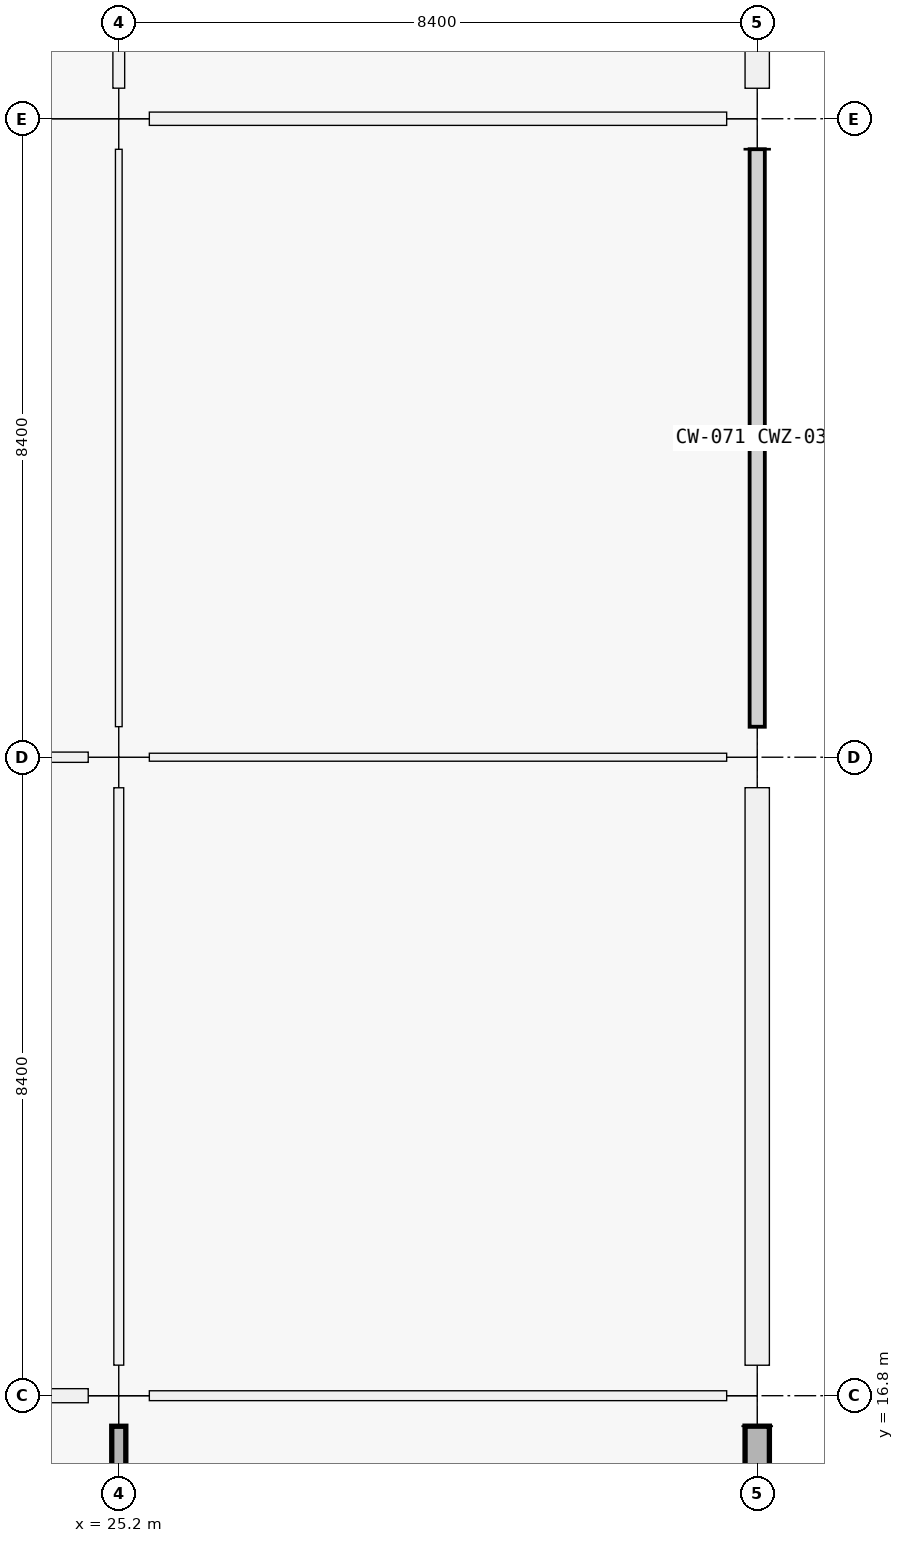
"""IFC4 building model, lengths in metres.
Left out: names, types, materials, properties, quantities, classifications, styles, units other than length and angle.
Written with IfcOpenShell. Run it as: python <this file> out.ifc"""

import sys

from ifc_helpers import new_model, si_unit, direction, frame, frame_2d, origin, origin_2d, place, context, subcontext, project, spatial, rectangle, extrude, element, fill, save


model = new_model("IFC4")
c1 = context("Model", 3, precision=1e-05, world=origin(), true_north=direction((0.0, 1.0)))
c2 = subcontext(c1, "Body", "Model", "MODEL_VIEW")
j1 = project(units=[si_unit("LENGTHUNIT", "METRE"), si_unit("PLANEANGLEUNIT", "RADIAN")], contexts=[c1])
p1 = place(None, origin())
s1 = spatial("IfcSite", under=j1, at=p1, CompositionType="ELEMENT")
p2 = place(p1, origin())
s2 = spatial("IfcBuilding", under=s1, at=p2, CompositionType="ELEMENT")
p3 = place(p2, frame((0.0, 0.0, 5.76)))
s3 = spatial("IfcBuildingStorey", under=s2, at=p3, CompositionType="ELEMENT", Elevation=5.76)
for number, where, z_axis, x_axis in (
    (1, (25.2, 16.8, 0.0), (0.0, 0.0, 1.0), (1.0, 0.0, 0.0)),
    (2, (25.2, 25.2, 0.0), (0.0, 0.0, 1.0), (1.0, 0.0, 0.0)),
    (3, (25.2, 33.6, 0.0), (0.0, 0.0, 1.0), (1.0, 0.0, 0.0)),
    (4, (33.6, 16.8, 0.0), (0.0, 0.0, 1.0), (1.0, 0.0, 0.0)),
    (5, (33.6, 25.2, 0.0), (0.0, 0.0, 1.0), (1.0, 0.0, 0.0)),
    (6, (33.6, 33.6, 0.0), (0.0, 0.0, 1.0), (1.0, 0.0, 0.0)),
):
    element("IfcColumn", number, at=place(p3, frame(where, z_axis=z_axis, x_axis=x_axis)), inside=s3, PredefinedType="COLUMN", context=c2, shape_type="SweptSolid", body=[
        extrude(rectangle(XDim=0.8, YDim=0.8, at=origin_2d()), origin(), (0.0, 0.0, 1.0), 4.5),
    ])
p4 = place(p3, frame((33.6, 16.399, 0.0), z_axis=(0.0, 0.0, 1.0), x_axis=(0.0, -1.0, 0.0)))
e7 = element("IfcWall", 7, at=p4, inside=s3, PredefinedType="SOLIDWALL", context=c2, shape_type="SweptSolid", body=[
    extrude(rectangle(XDim=7.698, YDim=0.32, at=frame_2d((3.849, 0.0))), origin(), (0.0, 0.0, 1.0), 3.4),
])
p5 = place(p4, frame((2.699, 0.0, 0.9)))
e8 = element("IfcOpeningElement", 8, at=p5, cuts=e7, PredefinedType="OPENING", context=c2, shape_type="SweptSolid", body=[
    extrude(rectangle(XDim=2.3, YDim=1.85, at=frame_2d((1.15, 0.925))), frame((0.0, 0.16, 0.0), z_axis=(0.0, -1.0, 0.0), x_axis=(1.0, 0.0, 0.0)), (0.0, 0.0, 1.0), 0.32),
])
p6 = place(p3, frame((33.6, 24.799, 0.0), z_axis=(0.0, 0.0, 1.0), x_axis=(0.0, -1.0, 0.0)))
e9 = element("IfcWall", 9, at=p6, inside=s3, PredefinedType="SOLIDWALL", context=c2, shape_type="SweptSolid", body=[
    extrude(rectangle(XDim=7.598, YDim=0.32, at=frame_2d((3.799, 0.0))), origin(), (0.0, 0.0, 1.0), 3.4),
])
p7 = place(p6, frame((2.349, 0.0, 0.9)))
e10 = element("IfcOpeningElement", 10, at=p7, cuts=e9, PredefinedType="OPENING", context=c2, shape_type="SweptSolid", body=[
    extrude(rectangle(XDim=2.9, YDim=1.85, at=frame_2d((1.45, 0.925))), frame((0.0, 0.16, 0.0), z_axis=(0.0, -1.0, 0.0), x_axis=(1.0, 0.0, 0.0)), (0.0, 0.0, 1.0), 0.32),
])
p8 = place(p3, frame((33.6, 41.599, 0.0), z_axis=(0.0, 0.0, 1.0), x_axis=(0.0, -1.0, 0.0)))
e11 = element("IfcWall", 11, at=p8, inside=s3, PredefinedType="SOLIDWALL", context=c2, shape_type="SweptSolid", body=[
    extrude(rectangle(XDim=7.598, YDim=0.32, at=frame_2d((3.799, 0.0))), origin(), (0.0, 0.0, 1.0), 3.4),
])
p9 = place(p8, frame((3.074, 0.0, 0.9)))
e12 = element("IfcOpeningElement", 12, at=p9, cuts=e11, PredefinedType="OPENING", context=c2, shape_type="SweptSolid", body=[
    extrude(rectangle(XDim=1.45, YDim=1.85, at=frame_2d((0.725, 0.925))), frame((0.0, 0.16, 0.0), z_axis=(0.0, -1.0, 0.0), x_axis=(1.0, 0.0, 0.0)), (0.0, 0.0, 1.0), 0.32),
])
p10 = place(p3, frame((17.202, 16.8, 0.0), z_axis=(0.0, 0.0, 1.0), x_axis=(1.0, 0.0, 0.0)))
e13 = element("IfcWall", 13, at=p10, inside=s3, PredefinedType="PARTITIONING", context=c2, shape_type="SweptSolid", body=[
    extrude(rectangle(XDim=7.596, YDim=0.185, at=frame_2d((3.798, 0.0))), origin(), (0.0, 0.0, 1.0), 2.4),
])
p11 = place(p10, frame((3.268, 0.0, 0.0)))
e14 = element("IfcOpeningElement", 14, at=p11, cuts=e13, PredefinedType="OPENING", context=c2, shape_type="SweptSolid", body=[
    extrude(rectangle(XDim=1.06, YDim=2.22, at=frame_2d((0.53, 1.11))), frame((0.0, 0.093, 0.0), z_axis=(0.0, -1.0, 0.0), x_axis=(1.0, 0.0, 0.0)), (0.0, 0.0, 1.0), 0.185),
])
p12 = place(p3, frame((17.202, 25.2, 0.0), z_axis=(0.0, 0.0, 1.0), x_axis=(1.0, 0.0, 0.0)))
e15 = element("IfcWall", 15, at=p12, inside=s3, PredefinedType="PARTITIONING", context=c2, shape_type="SweptSolid", body=[
    extrude(rectangle(XDim=7.596, YDim=0.135, at=frame_2d((3.798, 0.0))), origin(), (0.0, 0.0, 1.0), 2.4),
])
p13 = place(p12, frame((3.338, 0.0, 0.0)))
e16 = element("IfcOpeningElement", 16, at=p13, cuts=e15, PredefinedType="OPENING", context=c2, shape_type="SweptSolid", body=[
    extrude(rectangle(XDim=0.92, YDim=2.15, at=frame_2d((0.46, 1.075))), frame((0.0, 0.067, 0.0), z_axis=(0.0, -1.0, 0.0), x_axis=(1.0, 0.0, 0.0)), (0.0, 0.0, 1.0), 0.135),
])
p14 = place(p3, frame((25.602, 16.8, 0.0), z_axis=(0.0, 0.0, 1.0), x_axis=(1.0, 0.0, 0.0)))
e17 = element("IfcWall", 17, at=p14, inside=s3, PredefinedType="MOVABLE", context=c2, shape_type="SweptSolid", body=[
    extrude(rectangle(XDim=7.596, YDim=0.13, at=frame_2d((3.798, 0.0))), origin(), (0.0, 0.0, 1.0), 2.4),
])
p15 = place(p14, frame((3.313, 0.0, 0.0)))
e18 = element("IfcOpeningElement", 18, at=p15, cuts=e17, PredefinedType="OPENING", context=c2, shape_type="SweptSolid", body=[
    extrude(rectangle(XDim=0.97, YDim=2.12, at=frame_2d((0.485, 1.06))), frame((0.0, 0.065, 0.0), z_axis=(0.0, -1.0, 0.0), x_axis=(1.0, 0.0, 0.0)), (0.0, 0.0, 1.0), 0.13),
])
p16 = place(p3, frame((25.602, 25.2, 0.0), z_axis=(0.0, 0.0, 1.0), x_axis=(1.0, 0.0, 0.0)))
e19 = element("IfcWall", 19, at=p16, inside=s3, PredefinedType="PARTITIONING", context=c2, shape_type="SweptSolid", body=[
    extrude(rectangle(XDim=7.596, YDim=0.105, at=frame_2d((3.798, 0.0))), origin(), (0.0, 0.0, 1.0), 2.4),
])
p17 = place(p16, frame((3.278, 0.0, 0.0)))
e20 = element("IfcOpeningElement", 20, at=p17, cuts=e19, PredefinedType="OPENING", context=c2, shape_type="SweptSolid", body=[
    extrude(rectangle(XDim=1.04, YDim=2.2, at=frame_2d((0.52, 1.1))), frame((0.0, 0.052, 0.0), z_axis=(0.0, -1.0, 0.0), x_axis=(1.0, 0.0, 0.0)), (0.0, 0.0, 1.0), 0.105),
])
p18 = place(p3, frame((25.602, 33.6, 0.0), z_axis=(0.0, 0.0, 1.0), x_axis=(1.0, 0.0, 0.0)))
e21 = element("IfcWall", 21, at=p18, inside=s3, PredefinedType="PARTITIONING", context=c2, shape_type="SweptSolid", body=[
    extrude(rectangle(XDim=7.596, YDim=0.175, at=frame_2d((3.798, 0.0))), origin(), (0.0, 0.0, 1.0), 2.4),
])
p19 = place(p18, frame((3.333, 0.0, 0.0)))
e22 = element("IfcOpeningElement", 22, at=p19, cuts=e21, PredefinedType="OPENING", context=c2, shape_type="SweptSolid", body=[
    extrude(rectangle(XDim=0.93, YDim=2.12, at=frame_2d((0.465, 1.06))), frame((0.0, 0.087, 0.0), z_axis=(0.0, -1.0, 0.0), x_axis=(1.0, 0.0, 0.0)), (0.0, 0.0, 1.0), 0.175),
])
p20 = place(p3, frame((25.2, 8.727, 0.0), z_axis=(0.0, 0.0, 1.0), x_axis=(0.0, 1.0, 0.0)))
e23 = element("IfcWall", 23, at=p20, inside=s3, PredefinedType="PARTITIONING", context=c2, shape_type="SweptSolid", body=[
    extrude(rectangle(XDim=7.671, YDim=0.185, at=frame_2d((3.835, 0.0))), origin(), (0.0, 0.0, 1.0), 2.4),
])
p21 = place(p20, frame((3.306, 0.0, 0.0)))
e24 = element("IfcOpeningElement", 24, at=p21, cuts=e23, PredefinedType="OPENING", context=c2, shape_type="SweptSolid", body=[
    extrude(rectangle(XDim=1.06, YDim=2.22, at=frame_2d((0.53, 1.11))), frame((0.0, 0.093, 0.0), z_axis=(0.0, -1.0, 0.0), x_axis=(1.0, 0.0, 0.0)), (0.0, 0.0, 1.0), 0.185),
])
p22 = place(p3, frame((25.2, 17.202, 0.0), z_axis=(0.0, 0.0, 1.0), x_axis=(0.0, 1.0, 0.0)))
e25 = element("IfcWall", 25, at=p22, inside=s3, PredefinedType="MOVABLE", context=c2, shape_type="SweptSolid", body=[
    extrude(rectangle(XDim=7.596, YDim=0.13, at=frame_2d((3.798, 0.0))), origin(), (0.0, 0.0, 1.0), 2.4),
])
p23 = place(p22, frame((3.278, 0.0, 0.0)))
e26 = element("IfcOpeningElement", 26, at=p23, cuts=e25, PredefinedType="OPENING", context=c2, shape_type="SweptSolid", body=[
    extrude(rectangle(XDim=1.04, YDim=2.2, at=frame_2d((0.52, 1.1))), frame((0.0, 0.065, 0.0), z_axis=(0.0, -1.0, 0.0), x_axis=(1.0, 0.0, 0.0)), (0.0, 0.0, 1.0), 0.13),
])
p24 = place(p3, frame((25.2, 25.602, 0.0), z_axis=(0.0, 0.0, 1.0), x_axis=(0.0, 1.0, 0.0)))
e27 = element("IfcWall", 27, at=p24, inside=s3, PredefinedType="PARTITIONING", context=c2, shape_type="SweptSolid", body=[
    extrude(rectangle(XDim=7.596, YDim=0.088, at=frame_2d((3.798, 0.0))), origin(), (0.0, 0.0, 1.0), 2.4),
])
p25 = place(p24, frame((3.268, 0.0, 0.0)))
e28 = element("IfcOpeningElement", 28, at=p25, cuts=e27, PredefinedType="OPENING", context=c2, shape_type="SweptSolid", body=[
    extrude(rectangle(XDim=1.06, YDim=2.22, at=frame_2d((0.53, 1.11))), frame((0.0, 0.044, 0.0), z_axis=(0.0, -1.0, 0.0), x_axis=(1.0, 0.0, 0.0)), (0.0, 0.0, 1.0), 0.088),
])
p26 = place(p3, frame((25.2, 34.002, 0.0), z_axis=(0.0, 0.0, 1.0), x_axis=(0.0, 1.0, 0.0)))
e29 = element("IfcWall", 29, at=p26, inside=s3, PredefinedType="PARTITIONING", context=c2, shape_type="SweptSolid", body=[
    extrude(rectangle(XDim=7.596, YDim=0.155, at=frame_2d((3.798, 0.0))), origin(), (0.0, 0.0, 1.0), 2.4),
])
p27 = place(p26, frame((3.278, 0.0, 0.0)))
e30 = element("IfcOpeningElement", 30, at=p27, cuts=e29, PredefinedType="OPENING", context=c2, shape_type="SweptSolid", body=[
    extrude(rectangle(XDim=1.04, YDim=2.2, at=frame_2d((0.52, 1.1))), frame((0.0, 0.078, 0.0), z_axis=(0.0, -1.0, 0.0), x_axis=(1.0, 0.0, 0.0)), (0.0, 0.0, 1.0), 0.155),
])
p28 = place(p7, origin())
e31 = element("IfcWindow", 31, at=p28, inside=s3, PartitioningType="SINGLE_PANEL", PredefinedType="WINDOW", context=c2, shape_type="SweptSolid", body=[
    extrude(rectangle(XDim=2.9, YDim=1.85, at=frame_2d((1.45, 0.925))), frame((0.0, 0.03, 0.0), z_axis=(0.0, -1.0, 0.0), x_axis=(1.0, 0.0, 0.0)), (0.0, 0.0, 1.0), 0.06),
])
fill(e10, e31)
p29 = place(p25, origin())
e32 = element("IfcDoor", 32, at=p29, inside=s3, OperationType="SINGLE_SWING_LEFT", PredefinedType="DOOR", context=c2, shape_type="SweptSolid", body=[
    extrude(rectangle(XDim=1.06, YDim=2.22, at=frame_2d((0.53, 1.11))), frame((0.0, 0.025, 0.0), z_axis=(0.0, -1.0, 0.0), x_axis=(1.0, 0.0, 0.0)), (0.0, 0.0, 1.0), 0.05),
])
fill(e28, e32)
p30 = place(p15, origin())
e33 = element("IfcDoor", 33, at=p30, inside=s3, OperationType="SINGLE_SWING_RIGHT", PredefinedType="DOOR", context=c2, shape_type="SweptSolid", body=[
    extrude(rectangle(XDim=0.97, YDim=2.12, at=frame_2d((0.485, 1.06))), frame((0.0, 0.025, 0.0), z_axis=(0.0, -1.0, 0.0), x_axis=(1.0, 0.0, 0.0)), (0.0, 0.0, 1.0), 0.05),
])
fill(e18, e33)
p31 = place(p17, origin())
e34 = element("IfcDoor", 34, at=p31, inside=s3, OperationType="SINGLE_SWING_RIGHT", PredefinedType="DOOR", context=c2, shape_type="SweptSolid", body=[
    extrude(rectangle(XDim=1.04, YDim=2.2, at=frame_2d((0.52, 1.1))), frame((0.0, 0.025, 0.0), z_axis=(0.0, -1.0, 0.0), x_axis=(1.0, 0.0, 0.0)), (0.0, 0.0, 1.0), 0.05),
])
fill(e20, e34)
p32 = place(p19, origin())
e35 = element("IfcDoor", 35, at=p32, inside=s3, OperationType="SINGLE_SWING_RIGHT", PredefinedType="DOOR", context=c2, shape_type="SweptSolid", body=[
    extrude(rectangle(XDim=0.93, YDim=2.12, at=frame_2d((0.465, 1.06))), frame((0.0, 0.025, 0.0), z_axis=(0.0, -1.0, 0.0), x_axis=(1.0, 0.0, 0.0)), (0.0, 0.0, 1.0), 0.05),
])
fill(e22, e35)
p33 = place(p23, origin())
e36 = element("IfcDoor", 36, at=p33, inside=s3, OperationType="SINGLE_SWING_RIGHT", PredefinedType="DOOR", context=c2, shape_type="SweptSolid", body=[
    extrude(rectangle(XDim=1.04, YDim=2.2, at=frame_2d((0.52, 1.1))), frame((0.0, 0.025, 0.0), z_axis=(0.0, -1.0, 0.0), x_axis=(1.0, 0.0, 0.0)), (0.0, 0.0, 1.0), 0.05),
])
fill(e26, e36)
save(model, sys.argv[1])
